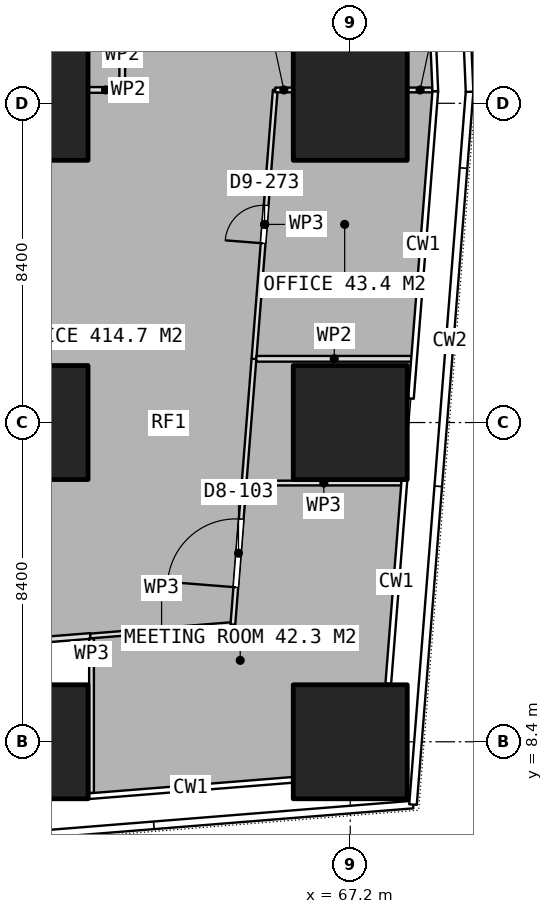
"""IFC4 building model, lengths in metres.
Left out: names, types, materials, properties, quantities, classifications, styles, units other than length and angle.
Written with IfcOpenShell. Run it as: python <this file> out.ifc"""

import sys

from ifc_helpers import new_model, si_unit, direction, frame, frame_2d, origin, origin_2d, place, context, subcontext, project, spatial, rectangle, extrude, element, fill, save


model = new_model("IFC4")
c1 = context("Model", 3, precision=1e-05, world=origin(), true_north=direction((0.0, 1.0)))
c2 = subcontext(c1, "Body", "Model", "MODEL_VIEW")
j1 = project(units=[si_unit("LENGTHUNIT", "METRE"), si_unit("PLANEANGLEUNIT", "RADIAN")], contexts=[c1])
p1 = place(None, origin())
s1 = spatial("IfcSite", under=j1, at=p1, CompositionType="ELEMENT")
p2 = place(p1, origin())
s2 = spatial("IfcBuilding", under=s1, at=p2, CompositionType="ELEMENT")
p3 = place(p2, frame((0.0, 0.0, 77.9)))
s3 = spatial("IfcBuildingStorey", under=s2, at=p3, CompositionType="ELEMENT", Elevation=77.9)
for number, where, z_axis, x_axis in (
    (1, (58.8, 8.4, 0.0), (0.0, 0.0, 1.0), (1.0, 0.0, 0.0)),
    (2, (58.8, 16.8, 0.0), (0.0, 0.0, 1.0), (1.0, 0.0, 0.0)),
    (3, (58.8, 25.2, 0.0), (0.0, 0.0, 1.0), (1.0, 0.0, 0.0)),
    (4, (67.2, 8.4, 0.0), (0.0, 0.0, 1.0), (1.0, 0.0, 0.0)),
    (5, (67.2, 16.8, 0.0), (0.0, 0.0, 1.0), (1.0, 0.0, 0.0)),
    (6, (67.2, 25.2, 0.0), (0.0, 0.0, 1.0), (1.0, 0.0, 0.0)),
):
    element("IfcColumn", number, at=place(p3, frame(where, z_axis=z_axis, x_axis=x_axis)), inside=s3, PredefinedType="COLUMN", context=c2, shape_type="SweptSolid", body=[
        extrude(rectangle(XDim=3.0, YDim=3.0, at=origin_2d()), origin(), (0.0, 0.0, 1.0), 3.75),
    ])
p4 = place(p3, frame((60.392, 7.054, 0.0), z_axis=(0.0, 0.0, 1.0), x_axis=(0.0, 1.0, 0.0)))
e7 = element("IfcWall", 7, at=p4, inside=s3, PredefinedType="PARTITIONING", context=c2, shape_type="SweptSolid", body=[
    extrude(rectangle(XDim=4.07, YDim=0.125, at=frame_2d((2.035, 0.0))), origin(), (0.0, 0.0, 1.0), 3.5),
])
p5 = place(p3, frame((60.36, 11.184, 0.0), z_axis=(0.0, 0.0, 1.0), x_axis=(0.996795236894, 0.079995348027, 0.0)))
e8 = element("IfcWall", 8, at=p5, inside=s3, PredefinedType="PARTITIONING", context=c2, shape_type="SweptSolid", body=[
    extrude(rectangle(XDim=3.763, YDim=0.125, at=frame_2d((1.881, 0.0))), origin(), (0.0, 0.0, 1.0), 3.5),
])
p6 = place(p3, frame((64.111, 11.485, 0.0), z_axis=(0.0, 0.0, 1.0), x_axis=(0.079075405568, 0.996868637401, 0.0)))
e9 = element("IfcWall", 9, at=p6, inside=s3, PredefinedType="PARTITIONING", context=c2, shape_type="SweptSolid", body=[
    extrude(rectangle(XDim=3.767, YDim=0.125, at=frame_2d((1.883, 0.0))), origin(), (0.0, 0.0, 1.0), 3.5),
])
p7 = place(p6, frame((0.983, 0.0, 0.0)))
e10 = element("IfcOpeningElement", 10, at=p7, cuts=e9, PredefinedType="OPENING", context=c2, shape_type="SweptSolid", body=[
    extrude(rectangle(XDim=1.8, YDim=2.1, at=frame_2d((0.9, 1.05))), frame((0.0, 0.073, 0.0), z_axis=(0.0, -1.0, 0.0), x_axis=(1.0, 0.0, 0.0)), (0.0, 0.0, 1.0), 0.145),
])
p8 = place(p3, frame((64.469, 15.208, 0.0), z_axis=(0.0, 0.0, 1.0), x_axis=(1.0, 0.0, 0.0)))
e11 = element("IfcWall", 11, at=p8, inside=s3, PredefinedType="PARTITIONING", context=c2, shape_type="SweptSolid", body=[
    extrude(rectangle(XDim=4.071, YDim=0.125, at=frame_2d((2.036, 0.0))), origin(), (0.0, 0.0, 1.0), 3.5),
])
p9 = place(p3, frame((65.227, 25.551, 0.0), z_axis=(0.0, 0.0, 1.0), x_axis=(1.0, 0.0, 0.0)))
e12 = element("IfcWall", 12, at=p9, inside=s3, PredefinedType="PARTITIONING", context=c2, shape_type="SweptSolid", body=[
    extrude(rectangle(XDim=0.453, YDim=0.125, at=frame_2d((0.227, 0.0))), origin(), (0.0, 0.0, 1.0), 3.5),
])
p10 = place(p3, frame((68.72, 25.551, 0.0), z_axis=(0.0, 0.0, 1.0), x_axis=(1.0, 0.0, 0.0)))
e13 = element("IfcWall", 13, at=p10, inside=s3, PredefinedType="PARTITIONING", context=c2, shape_type="SweptSolid", body=[
    extrude(rectangle(XDim=0.637, YDim=0.125, at=frame_2d((0.318, 0.0))), origin(), (0.0, 0.0, 1.0), 3.5),
])
p11 = place(p3, frame((64.409, 15.241, 0.0), z_axis=(0.0, 0.0, 1.0), x_axis=(0.079215977886, 0.996857476697, 0.0)))
e14 = element("IfcWall", 14, at=p11, inside=s3, PredefinedType="PARTITIONING", context=c2, shape_type="SweptSolid", body=[
    extrude(rectangle(XDim=3.245, YDim=0.125, at=frame_2d((1.623, 0.0))), origin(), (0.0, 0.0, 1.0), 3.5),
])
p12 = place(p3, frame((64.666, 18.476, 0.0), z_axis=(0.0, 0.0, 1.0), x_axis=(0.079050645003, 0.996870601194, 0.0)))
e15 = element("IfcWall", 15, at=p12, inside=s3, PredefinedType="PARTITIONING", context=c2, shape_type="SweptSolid", body=[
    extrude(rectangle(XDim=7.097, YDim=0.125, at=frame_2d((3.549, 0.0))), origin(), (0.0, 0.0, 1.0), 3.5),
])
p13 = place(p12, frame((3.049, 0.0, 0.0)))
e16 = element("IfcOpeningElement", 16, at=p13, cuts=e15, PredefinedType="OPENING", context=c2, shape_type="SweptSolid", body=[
    extrude(rectangle(XDim=1.0, YDim=2.1, at=frame_2d((0.5, 1.05))), frame((0.0, 0.073, 0.0), z_axis=(0.0, -1.0, 0.0), x_axis=(1.0, 0.0, 0.0)), (0.0, 0.0, 1.0), 0.145),
])
p14 = place(p3, frame((60.32, 25.552, 0.0), z_axis=(0.0, 0.0, 1.0), x_axis=(1.0, 0.0, 0.0)))
e17 = element("IfcWall", 17, at=p14, inside=s3, PredefinedType="PARTITIONING", context=c2, shape_type="SweptSolid", body=[
    extrude(rectangle(XDim=0.88, YDim=0.15, at=frame_2d((0.44, 0.0))), origin(), (0.0, 0.0, 1.0), 3.5),
])
p15 = place(p3, frame((61.2, 25.552, 0.0), z_axis=(0.0, 0.0, 1.0), x_axis=(0.0, 1.0, 0.0)))
e18 = element("IfcWall", 18, at=p15, inside=s3, PredefinedType="PARTITIONING", context=c2, shape_type="SweptSolid", body=[
    extrude(rectangle(XDim=2.648, YDim=0.15, at=frame_2d((1.324, 0.0))), origin(), (0.0, 0.0, 1.0), 3.5),
])
p16 = place(p3, frame((64.729, 18.477, 0.0), z_axis=(0.0, 0.0, 1.0), x_axis=(1.0, 0.0, 0.0)))
e19 = element("IfcWall", 19, at=p16, inside=s3, PredefinedType="PARTITIONING", context=c2, shape_type="SweptSolid", body=[
    extrude(rectangle(XDim=4.1, YDim=0.15, at=frame_2d((2.05, 0.0))), origin(), (0.0, 0.0, 1.0), 3.5),
])
p17 = place(p3, frame((60.359, 11.184, 0.0), z_axis=(0.0, 0.0, 1.0), x_axis=(-0.996797760889, -0.079963891146, 0.0)))
e20 = element("IfcWall", 20, at=p17, inside=s3, PredefinedType="PARTITIONING", context=c2, shape_type="SweptSolid", body=[
    extrude(rectangle(XDim=3.239, YDim=0.15, at=frame_2d((1.62, 0.0))), origin(), (0.0, 0.0, 1.0), 3.5),
])
p18 = place(p7, origin())
e21 = element("IfcDoor", 21, at=p18, inside=s3, OperationType="DOUBLE_DOOR_SINGLE_SWING", PredefinedType="DOOR", context=c2, shape_type="SweptSolid", body=[
    extrude(rectangle(XDim=1.8, YDim=2.1, at=frame_2d((0.9, 1.05))), frame((0.0, 0.025, 0.0), z_axis=(0.0, -1.0, 0.0), x_axis=(1.0, 0.0, 0.0)), (0.0, 0.0, 1.0), 0.05),
])
fill(e10, e21)
p19 = place(p13, origin())
e22 = element("IfcDoor", 22, at=p19, inside=s3, OperationType="SINGLE_SWING_LEFT", PredefinedType="DOOR", context=c2, shape_type="SweptSolid", body=[
    extrude(rectangle(XDim=1.0, YDim=2.1, at=frame_2d((0.5, 1.05))), frame((0.0, 0.025, 0.0), z_axis=(0.0, -1.0, 0.0), x_axis=(1.0, 0.0, 0.0)), (0.0, 0.0, 1.0), 0.05),
])
fill(e16, e22)
save(model, sys.argv[1])
